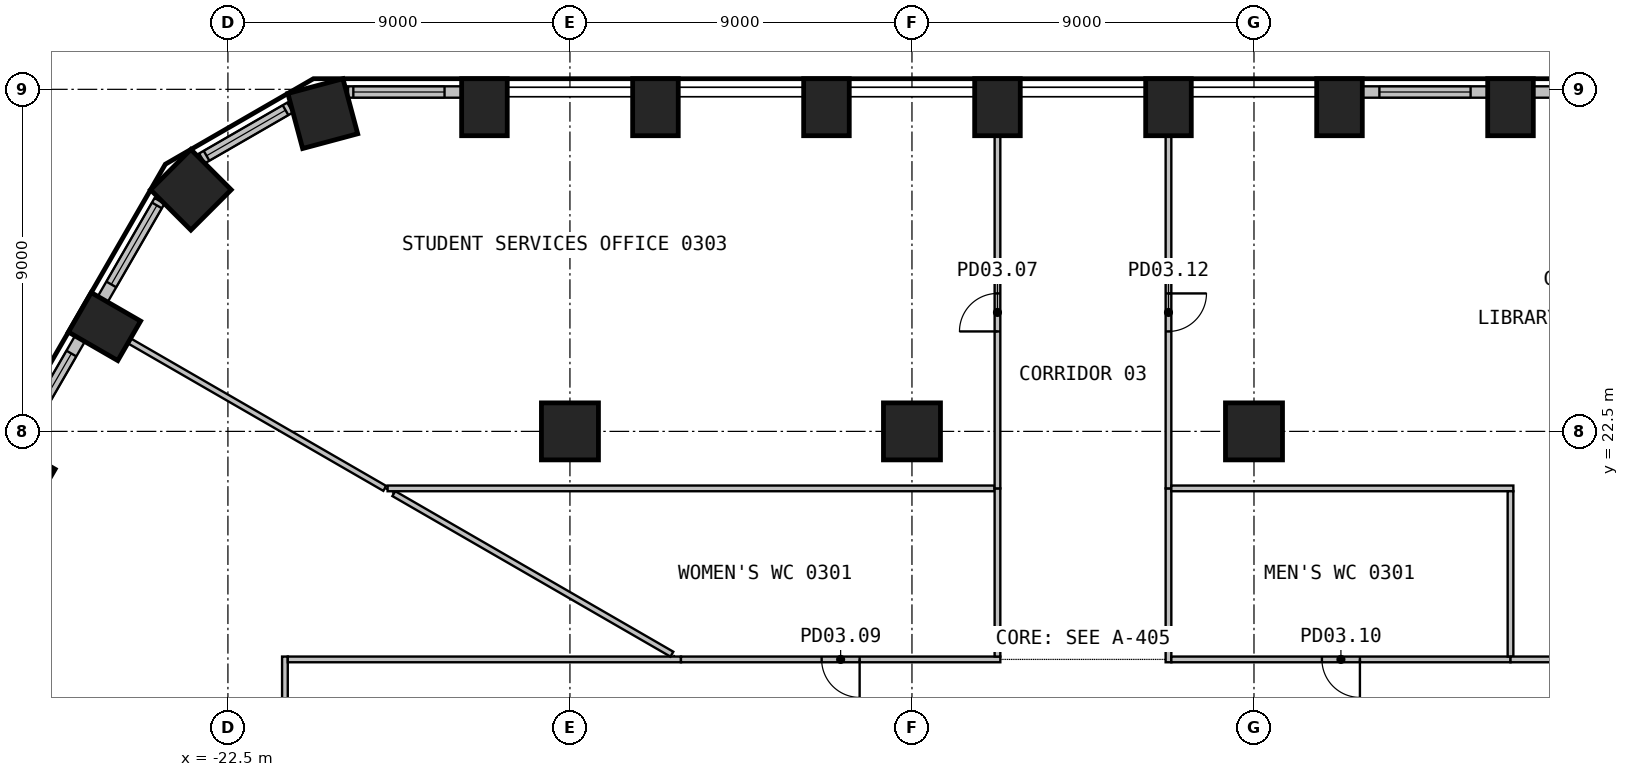
"""IFC4 building model, lengths in metres.
Left out: names, types, materials, properties, quantities, classifications, styles, units other than length and angle.
Written with IfcOpenShell. Run it as: python <this file> out.ifc"""

import sys

from ifc_helpers import new_model, si_unit, direction, frame, frame_2d, origin, origin_2d, place, context, subcontext, project, spatial, rectangle, circle, extrude, element, fill, save


model = new_model("IFC4")
c1 = context("Model", 3, precision=1e-05, world=origin(), true_north=direction((0.0, 1.0)))
c2 = subcontext(c1, "Body", "Model", "MODEL_VIEW")
j1 = project(units=[si_unit("LENGTHUNIT", "METRE"), si_unit("PLANEANGLEUNIT", "RADIAN")], contexts=[c1])
p1 = place(None, origin())
s1 = spatial("IfcSite", under=j1, at=p1, CompositionType="ELEMENT")
p2 = place(p1, origin())
s2 = spatial("IfcBuilding", under=s1, at=p2, CompositionType="ELEMENT")
p3 = place(p2, frame((0.0, 0.0, 15.6)))
s3 = spatial("IfcBuildingStorey", under=s2, at=p3, CompositionType="ELEMENT", Elevation=15.6)
for number, where, z_axis, x_axis in (
    (1, (11.25, 31.03, 0.0), (0.0, 0.0, 1.0), (-1.0, 0.0, 0.0)),
    (2, (6.75, 31.03, 0.0), (0.0, 0.0, 1.0), (-1.0, 0.0, 0.0)),
    (3, (2.25, 31.03, 0.0), (0.0, 0.0, 1.0), (-1.0, 0.0, 0.0)),
    (4, (-2.25, 31.03, 0.0), (0.0, 0.0, 1.0), (-1.0, 0.0, 0.0)),
    (5, (-6.75, 31.03, 0.0), (0.0, 0.0, 1.0), (-1.0, 0.0, 0.0)),
    (6, (-11.25, 31.03, 0.0), (0.0, 0.0, 1.0), (-1.0, 0.0, 0.0)),
    (7, (-15.75, 31.03, 0.0), (0.0, 0.0, 1.0), (-1.0, 0.0, 0.0)),
):
    element("IfcColumn", number, at=place(p3, frame(where, z_axis=z_axis, x_axis=x_axis)), inside=s3, PredefinedType="COLUMN", context=c2, shape_type="SweptSolid", body=[
        extrude(rectangle(XDim=1.2, YDim=1.5, at=origin_2d()), origin(), (0.0, 0.0, 1.0), 4.4),
    ])
for number, where, z_axis, x_axis in (
    (8, (-20.004, 30.861, 0.0), (0.0, 0.0, 1.0), (-0.966, -0.259, 0.0)),
    (9, (-23.475, 28.857, 0.0), (0.0, 0.0, 1.0), (-0.707, -0.707, 0.0)),
):
    element("IfcColumn", number, at=place(p3, frame(where, z_axis=z_axis, x_axis=x_axis)), inside=s3, PredefinedType="COLUMN", context=c2, shape_type="SweptSolid", body=[
        extrude(rectangle(XDim=1.5, YDim=1.5, at=origin_2d()), origin(), (0.0, 0.0, 1.0), 4.4),
    ])
for number, where, z_axis, x_axis in (
    (10, (-25.748, 25.258, 0.0), (0.0, 0.0, 1.0), (-0.5, -0.866, 0.0)),
    (11, (-27.998, 21.361, 0.0), (0.0, 0.0, 1.0), (-0.5, -0.866, 0.0)),
):
    element("IfcColumn", number, at=place(p3, frame(where, z_axis=z_axis, x_axis=x_axis)), inside=s3, PredefinedType="COLUMN", context=c2, shape_type="SweptSolid", body=[
        extrude(rectangle(XDim=1.2, YDim=1.5, at=origin_2d()), origin(), (0.0, 0.0, 1.0), 4.4),
    ])
for number, where, z_axis, x_axis in (
    (12, (-13.5, 22.5, 0.0), (0.0, 0.0, 1.0), (1.0, 0.0, 0.0)),
    (13, (-4.5, 22.5, 0.0), (0.0, 0.0, 1.0), (1.0, 0.0, 0.0)),
    (14, (4.5, 22.5, 0.0), (0.0, 0.0, 1.0), (1.0, 0.0, 0.0)),
):
    element("IfcColumn", number, at=place(p3, frame(where, z_axis=z_axis, x_axis=x_axis)), inside=s3, PredefinedType="COLUMN", context=c2, shape_type="SweptSolid", body=[
        extrude(circle(Radius=0.75, at=origin_2d()), origin(), (0.0, 0.0, 1.0), 4.4),
    ])
p4 = place(p3, frame((15.149, 31.43, 0.0), z_axis=(0.0, 0.0, 1.0), x_axis=(-1.0, 0.0, 0.0)))
e15 = element("IfcWall", 15, at=p4, inside=s3, PredefinedType="SOLIDWALL", context=c2, shape_type="SweptSolid", body=[
    extrude(rectangle(XDim=3.299, YDim=0.3, at=frame_2d((1.649, 0.0))), origin(), (0.0, 0.0, 1.0), 4.4),
])
p5 = place(p4, frame((0.449, 0.0, 0.9)))
e16 = element("IfcOpeningElement", 16, at=p5, cuts=e15, PredefinedType="OPENING", context=c2, shape_type="SweptSolid", body=[
    extrude(rectangle(XDim=2.4, YDim=3.0, at=frame_2d((1.2, 1.5))), frame((0.0, 0.16, 0.0), z_axis=(0.0, -1.0, 0.0), x_axis=(1.0, 0.0, 0.0)), (0.0, 0.0, 1.0), 0.32),
])
p6 = place(p3, frame((10.649, 31.43, 0.0), z_axis=(0.0, 0.0, 1.0), x_axis=(-1.0, 0.0, 0.0)))
e17 = element("IfcWall", 17, at=p6, inside=s3, PredefinedType="SOLIDWALL", context=c2, shape_type="SweptSolid", body=[
    extrude(rectangle(XDim=3.299, YDim=0.3, at=frame_2d((1.649, 0.0))), origin(), (0.0, 0.0, 1.0), 4.4),
])
p7 = place(p6, frame((0.449, 0.0, 0.9)))
e18 = element("IfcOpeningElement", 18, at=p7, cuts=e17, PredefinedType="OPENING", context=c2, shape_type="SweptSolid", body=[
    extrude(rectangle(XDim=2.4, YDim=3.0, at=frame_2d((1.2, 1.5))), frame((0.0, 0.16, 0.0), z_axis=(0.0, -1.0, 0.0), x_axis=(1.0, 0.0, 0.0)), (0.0, 0.0, 1.0), 0.32),
])
p8 = place(p3, frame((-16.351, 31.43, 0.0), z_axis=(0.0, 0.0, 1.0), x_axis=(-1.0, 0.0, 0.0)))
e19 = element("IfcWall", 19, at=p8, inside=s3, PredefinedType="SOLIDWALL", context=c2, shape_type="SweptSolid", body=[
    extrude(rectangle(XDim=2.989, YDim=0.3, at=frame_2d((1.494, 0.0))), origin(), (0.0, 0.0, 1.0), 4.4),
])
p9 = place(p8, frame((0.449, 0.0, 0.9)))
e20 = element("IfcOpeningElement", 20, at=p9, cuts=e19, PredefinedType="OPENING", context=c2, shape_type="SweptSolid", body=[
    extrude(rectangle(XDim=2.4, YDim=3.0, at=frame_2d((1.2, 1.5))), frame((0.0, 0.16, 0.0), z_axis=(0.0, -1.0, 0.0), x_axis=(1.0, 0.0, 0.0)), (0.0, 0.0, 1.0), 0.32),
])
p10 = place(p3, frame((-20.864, 31.021, 0.0), z_axis=(0.0, 0.0, 1.0), x_axis=(-0.866001915448, -0.500040680786, 0.0)))
e21 = element("IfcWall", 21, at=p10, inside=s3, PredefinedType="SOLIDWALL", context=c2, shape_type="SweptSolid", body=[
    extrude(rectangle(XDim=2.678, YDim=0.3, at=frame_2d((1.339, 0.0))), origin(), (0.0, 0.0, 1.0), 4.4),
])
p11 = place(p10, frame((0.139, 0.0, 0.9)))
e22 = element("IfcOpeningElement", 22, at=p11, cuts=e21, PredefinedType="OPENING", context=c2, shape_type="SweptSolid", body=[
    extrude(rectangle(XDim=2.4, YDim=3.0, at=frame_2d((1.2, 1.5))), frame((0.0, 0.16, 0.0), z_axis=(0.0, -1.0, 0.0), x_axis=(1.0, 0.0, 0.0)), (0.0, 0.0, 1.0), 0.32),
])
p12 = place(p3, frame((-24.299, 28.566, 0.0), z_axis=(0.0, 0.0, 1.0), x_axis=(-0.49999586137, -0.866027793211, 0.0)))
e23 = element("IfcWall", 23, at=p12, inside=s3, PredefinedType="SOLIDWALL", context=c2, shape_type="SweptSolid", body=[
    extrude(rectangle(XDim=2.989, YDim=0.3, at=frame_2d((1.494, 0.0))), origin(), (0.0, 0.0, 1.0), 4.4),
])
p13 = place(p12, frame((0.139, 0.0, 0.9)))
e24 = element("IfcOpeningElement", 24, at=p13, cuts=e23, PredefinedType="OPENING", context=c2, shape_type="SweptSolid", body=[
    extrude(rectangle(XDim=2.4, YDim=3.0, at=frame_2d((1.2, 1.5))), frame((0.0, 0.16, 0.0), z_axis=(0.0, -1.0, 0.0), x_axis=(1.0, 0.0, 0.0)), (0.0, 0.0, 1.0), 0.32),
])
p14 = place(p3, frame((-26.394, 24.938, 0.0), z_axis=(0.0, 0.0, 1.0), x_axis=(-0.499991515992, -0.866030301974, 0.0)))
e25 = element("IfcWall", 25, at=p14, inside=s3, PredefinedType="SOLIDWALL", context=c2, shape_type="SweptSolid", body=[
    extrude(rectangle(XDim=3.299, YDim=0.3, at=frame_2d((1.649, 0.0))), origin(), (0.0, 0.0, 1.0), 4.4),
])
p15 = place(p14, frame((0.449, 0.0, 0.9)))
e26 = element("IfcOpeningElement", 26, at=p15, cuts=e25, PredefinedType="OPENING", context=c2, shape_type="SweptSolid", body=[
    extrude(rectangle(XDim=2.4, YDim=3.0, at=frame_2d((1.2, 1.5))), frame((0.0, 0.16, 0.0), z_axis=(0.0, -1.0, 0.0), x_axis=(1.0, 0.0, 0.0)), (0.0, 0.0, 1.0), 0.32),
])
p16 = place(p3, frame((-25.081, 24.873, 0.0), z_axis=(0.0, 0.0, 1.0), x_axis=(0.865999760466, -0.500044412901, 0.0)))
e27 = element("IfcWall", 27, at=p16, inside=s3, PredefinedType="PARTITIONING", context=c2, shape_type="SweptSolid", body=[
    extrude(rectangle(XDim=7.745, YDim=0.15, at=frame_2d((3.873, 0.0))), origin(), (0.0, 0.0, 1.0), 4.4),
])
p17 = place(p3, frame((-21.0, 16.575, 0.0), z_axis=(0.0, 0.0, 1.0), x_axis=(0.0, -1.0, 0.0)))
e28 = element("IfcWall", 28, at=p17, inside=s3, PredefinedType="PARTITIONING", context=c2, shape_type="SweptSolid", body=[
    extrude(rectangle(XDim=14.25, YDim=0.15, at=frame_2d((7.125, 0.0))), origin(), (0.0, 0.0, 1.0), 4.4),
])
p18 = place(p17, frame((6.625, 0.0, 0.0)))
e29 = element("IfcOpeningElement", 29, at=p18, cuts=e28, PredefinedType="OPENING", context=c2, shape_type="SweptSolid", body=[
    extrude(rectangle(XDim=1.0, YDim=2.1, at=frame_2d((0.5, 1.05))), frame((0.0, 0.085, 0.0), z_axis=(0.0, -1.0, 0.0), x_axis=(1.0, 0.0, 0.0)), (0.0, 0.0, 1.0), 0.17),
])
p19 = place(p3, frame((-10.579, 16.5, 0.0), z_axis=(0.0, 0.0, 1.0), x_axis=(-1.0, 0.0, 0.0)))
e30 = element("IfcWall", 30, at=p19, inside=s3, PredefinedType="PARTITIONING", context=c2, shape_type="SweptSolid", body=[
    extrude(rectangle(XDim=10.346, YDim=0.15, at=frame_2d((5.173, 0.0))), origin(), (0.0, 0.0, 1.0), 4.4),
])
p20 = place(p3, frame((-18.135, 20.863, 0.0), z_axis=(0.0, 0.0, 1.0), x_axis=(0.866011886744, -0.50002341147, 0.0)))
e31 = element("IfcWall", 31, at=p20, inside=s3, PredefinedType="PARTITIONING", context=c2, shape_type="SweptSolid", body=[
    extrude(rectangle(XDim=8.45, YDim=0.15, at=frame_2d((4.225, 0.0))), origin(), (0.0, 0.0, 1.0), 4.4),
])
p21 = place(p3, frame((-2.325, 21.0, 0.0), z_axis=(0.0, 0.0, 1.0), x_axis=(-1.0, 0.0, 0.0)))
e32 = element("IfcWall", 32, at=p21, inside=s3, PredefinedType="PARTITIONING", context=c2, shape_type="SweptSolid", body=[
    extrude(rectangle(XDim=15.973, YDim=0.15, at=frame_2d((7.987, 0.0))), origin(), (0.0, 0.0, 1.0), 4.4),
])
p22 = place(p3, frame((-2.175, 16.5, 0.0), z_axis=(0.0, 0.0, 1.0), x_axis=(-1.0, 0.0, 0.0)))
e33 = element("IfcWall", 33, at=p22, inside=s3, PredefinedType="PARTITIONING", context=c2, shape_type="SweptSolid", body=[
    extrude(rectangle(XDim=8.404, YDim=0.15, at=frame_2d((4.202, 0.0))), origin(), (0.0, 0.0, 1.0), 4.4),
])
p23 = place(p22, frame((3.702, 0.0, 0.0)))
e34 = element("IfcOpeningElement", 34, at=p23, cuts=e33, PredefinedType="OPENING", context=c2, shape_type="SweptSolid", body=[
    extrude(rectangle(XDim=1.0, YDim=2.1, at=frame_2d((0.5, 1.05))), frame((0.0, 0.085, 0.0), z_axis=(0.0, -1.0, 0.0), x_axis=(1.0, 0.0, 0.0)), (0.0, 0.0, 1.0), 0.17),
])
p24 = place(p3, frame((-2.25, 16.575, 0.0), z_axis=(0.0, 0.0, 1.0), x_axis=(0.0, 1.0, 0.0)))
e35 = element("IfcWall", 35, at=p24, inside=s3, PredefinedType="PARTITIONING", context=c2, shape_type="SweptSolid", body=[
    extrude(rectangle(XDim=4.425, YDim=0.15, at=frame_2d((2.212, 0.0))), origin(), (0.0, 0.0, 1.0), 4.4),
])
p25 = place(p3, frame((-2.25, 21.0, 0.0), z_axis=(0.0, 0.0, 1.0), x_axis=(0.0, 1.0, 0.0)))
e36 = element("IfcWall", 36, at=p25, inside=s3, PredefinedType="PARTITIONING", context=c2, shape_type="SweptSolid", body=[
    extrude(rectangle(XDim=9.26, YDim=0.15, at=frame_2d((4.63, 0.0))), origin(), (0.0, 0.0, 1.0), 4.4),
])
p26 = place(p25, frame((4.13, 0.0, 0.0)))
e37 = element("IfcOpeningElement", 37, at=p26, cuts=e36, PredefinedType="OPENING", context=c2, shape_type="SweptSolid", body=[
    extrude(rectangle(XDim=1.0, YDim=2.1, at=frame_2d((0.5, 1.05))), frame((0.0, 0.085, 0.0), z_axis=(0.0, -1.0, 0.0), x_axis=(1.0, 0.0, 0.0)), (0.0, 0.0, 1.0), 0.17),
])
p27 = place(p3, frame((2.25, 21.0, 0.0), z_axis=(0.0, 0.0, 1.0), x_axis=(0.0, -1.0, 0.0)))
e38 = element("IfcWall", 38, at=p27, inside=s3, PredefinedType="PARTITIONING", context=c2, shape_type="SweptSolid", body=[
    extrude(rectangle(XDim=4.575, YDim=0.15, at=frame_2d((2.288, 0.0))), origin(), (0.0, 0.0, 1.0), 4.4),
])
p28 = place(p3, frame((11.25, 16.5, 0.0), z_axis=(0.0, 0.0, 1.0), x_axis=(-1.0, 0.0, 0.0)))
e39 = element("IfcWall", 39, at=p28, inside=s3, PredefinedType="PARTITIONING", context=c2, shape_type="SweptSolid", body=[
    extrude(rectangle(XDim=8.925, YDim=0.15, at=frame_2d((4.462, 0.0))), origin(), (0.0, 0.0, 1.0), 4.4),
])
p29 = place(p28, frame((3.962, 0.0, 0.0)))
e40 = element("IfcOpeningElement", 40, at=p29, cuts=e39, PredefinedType="OPENING", context=c2, shape_type="SweptSolid", body=[
    extrude(rectangle(XDim=1.0, YDim=2.1, at=frame_2d((0.5, 1.05))), frame((0.0, 0.085, 0.0), z_axis=(0.0, -1.0, 0.0), x_axis=(1.0, 0.0, 0.0)), (0.0, 0.0, 1.0), 0.17),
])
p30 = place(p3, frame((2.25, 30.26, 0.0), z_axis=(0.0, 0.0, 1.0), x_axis=(0.0, -1.0, 0.0)))
e41 = element("IfcWall", 41, at=p30, inside=s3, PredefinedType="PARTITIONING", context=c2, shape_type="SweptSolid", body=[
    extrude(rectangle(XDim=9.26, YDim=0.15, at=frame_2d((4.63, 0.0))), origin(), (0.0, 0.0, 1.0), 4.4),
])
p31 = place(p30, frame((4.13, 0.0, 0.0)))
e42 = element("IfcOpeningElement", 42, at=p31, cuts=e41, PredefinedType="OPENING", context=c2, shape_type="SweptSolid", body=[
    extrude(rectangle(XDim=1.0, YDim=2.1, at=frame_2d((0.5, 1.05))), frame((0.0, 0.085, 0.0), z_axis=(0.0, -1.0, 0.0), x_axis=(1.0, 0.0, 0.0)), (0.0, 0.0, 1.0), 0.17),
])
p32 = place(p3, frame((2.325, 21.0, 0.0), z_axis=(0.0, 0.0, 1.0), x_axis=(1.0, 0.0, 0.0)))
e43 = element("IfcWall", 43, at=p32, inside=s3, PredefinedType="PARTITIONING", context=c2, shape_type="SweptSolid", body=[
    extrude(rectangle(XDim=9.0, YDim=0.15, at=frame_2d((4.5, 0.0))), origin(), (0.0, 0.0, 1.0), 4.4),
])
p33 = place(p3, frame((11.25, 20.925, 0.0), z_axis=(0.0, 0.0, 1.0), x_axis=(0.0, -1.0, 0.0)))
e44 = element("IfcWall", 44, at=p33, inside=s3, PredefinedType="PARTITIONING", context=c2, shape_type="SweptSolid", body=[
    extrude(rectangle(XDim=4.35, YDim=0.15, at=frame_2d((2.175, 0.0))), origin(), (0.0, 0.0, 1.0), 4.4),
])
p34 = place(p3, frame((19.579, 16.5, 0.0), z_axis=(0.0, 0.0, 1.0), x_axis=(-1.0, 0.0, 0.0)))
e45 = element("IfcWall", 45, at=p34, inside=s3, PredefinedType="PARTITIONING", context=c2, shape_type="SweptSolid", body=[
    extrude(rectangle(XDim=8.329, YDim=0.15, at=frame_2d((4.165, 0.0))), origin(), (0.0, 0.0, 1.0), 4.4),
])
p35 = place(p7, origin())
e46 = element("IfcWindow", 46, at=p35, inside=s3, PartitioningType="SINGLE_PANEL", PredefinedType="WINDOW", context=c2, shape_type="SweptSolid", body=[
    extrude(rectangle(XDim=2.4, YDim=3.0, at=frame_2d((1.2, 1.5))), frame((0.0, 0.03, 0.0), z_axis=(0.0, -1.0, 0.0), x_axis=(1.0, 0.0, 0.0)), (0.0, 0.0, 1.0), 0.06),
])
fill(e18, e46)
p36 = place(p9, origin())
e47 = element("IfcWindow", 47, at=p36, inside=s3, PartitioningType="SINGLE_PANEL", PredefinedType="WINDOW", context=c2, shape_type="SweptSolid", body=[
    extrude(rectangle(XDim=2.4, YDim=3.0, at=frame_2d((1.2, 1.5))), frame((0.0, 0.03, 0.0), z_axis=(0.0, -1.0, 0.0), x_axis=(1.0, 0.0, 0.0)), (0.0, 0.0, 1.0), 0.06),
])
fill(e20, e47)
p37 = place(p11, origin())
e48 = element("IfcWindow", 48, at=p37, inside=s3, PartitioningType="SINGLE_PANEL", PredefinedType="WINDOW", context=c2, shape_type="SweptSolid", body=[
    extrude(rectangle(XDim=2.4, YDim=3.0, at=frame_2d((1.2, 1.5))), frame((0.0, 0.03, 0.0), z_axis=(0.0, -1.0, 0.0), x_axis=(1.0, 0.0, 0.0)), (0.0, 0.0, 1.0), 0.06),
])
fill(e22, e48)
p38 = place(p13, origin())
e49 = element("IfcWindow", 49, at=p38, inside=s3, PartitioningType="SINGLE_PANEL", PredefinedType="WINDOW", context=c2, shape_type="SweptSolid", body=[
    extrude(rectangle(XDim=2.4, YDim=3.0, at=frame_2d((1.2, 1.5))), frame((0.0, 0.03, 0.0), z_axis=(0.0, -1.0, 0.0), x_axis=(1.0, 0.0, 0.0)), (0.0, 0.0, 1.0), 0.06),
])
fill(e24, e49)
p39 = place(p15, origin())
e50 = element("IfcWindow", 50, at=p39, inside=s3, PartitioningType="SINGLE_PANEL", PredefinedType="WINDOW", context=c2, shape_type="SweptSolid", body=[
    extrude(rectangle(XDim=2.4, YDim=3.0, at=frame_2d((1.2, 1.5))), frame((0.0, 0.03, 0.0), z_axis=(0.0, -1.0, 0.0), x_axis=(1.0, 0.0, 0.0)), (0.0, 0.0, 1.0), 0.06),
])
fill(e26, e50)
p40 = place(p26, origin())
e51 = element("IfcDoor", 51, at=p40, inside=s3, OperationType="SINGLE_SWING_LEFT", PredefinedType="DOOR", context=c2, shape_type="SweptSolid", body=[
    extrude(rectangle(XDim=1.0, YDim=2.1, at=frame_2d((0.5, 1.05))), frame((0.0, 0.025, 0.0), z_axis=(0.0, -1.0, 0.0), x_axis=(1.0, 0.0, 0.0)), (0.0, 0.0, 1.0), 0.05),
])
fill(e37, e51)
p41 = place(p23, origin())
e52 = element("IfcDoor", 52, at=p41, inside=s3, OperationType="SINGLE_SWING_LEFT", PredefinedType="DOOR", context=c2, shape_type="SweptSolid", body=[
    extrude(rectangle(XDim=1.0, YDim=2.1, at=frame_2d((0.5, 1.05))), frame((0.0, 0.025, 0.0), z_axis=(0.0, -1.0, 0.0), x_axis=(1.0, 0.0, 0.0)), (0.0, 0.0, 1.0), 0.05),
])
fill(e34, e52)
p42 = place(p29, origin())
e53 = element("IfcDoor", 53, at=p42, inside=s3, OperationType="SINGLE_SWING_RIGHT", PredefinedType="DOOR", context=c2, shape_type="SweptSolid", body=[
    extrude(rectangle(XDim=1.0, YDim=2.1, at=frame_2d((0.5, 1.05))), frame((0.0, 0.025, 0.0), z_axis=(0.0, -1.0, 0.0), x_axis=(1.0, 0.0, 0.0)), (0.0, 0.0, 1.0), 0.05),
])
fill(e40, e53)
p43 = place(p31, origin())
e54 = element("IfcDoor", 54, at=p43, inside=s3, OperationType="SINGLE_SWING_LEFT", PredefinedType="DOOR", context=c2, shape_type="SweptSolid", body=[
    extrude(rectangle(XDim=1.0, YDim=2.1, at=frame_2d((0.5, 1.05))), frame((0.0, 0.025, 0.0), z_axis=(0.0, -1.0, 0.0), x_axis=(1.0, 0.0, 0.0)), (0.0, 0.0, 1.0), 0.05),
])
fill(e42, e54)
save(model, sys.argv[1])
